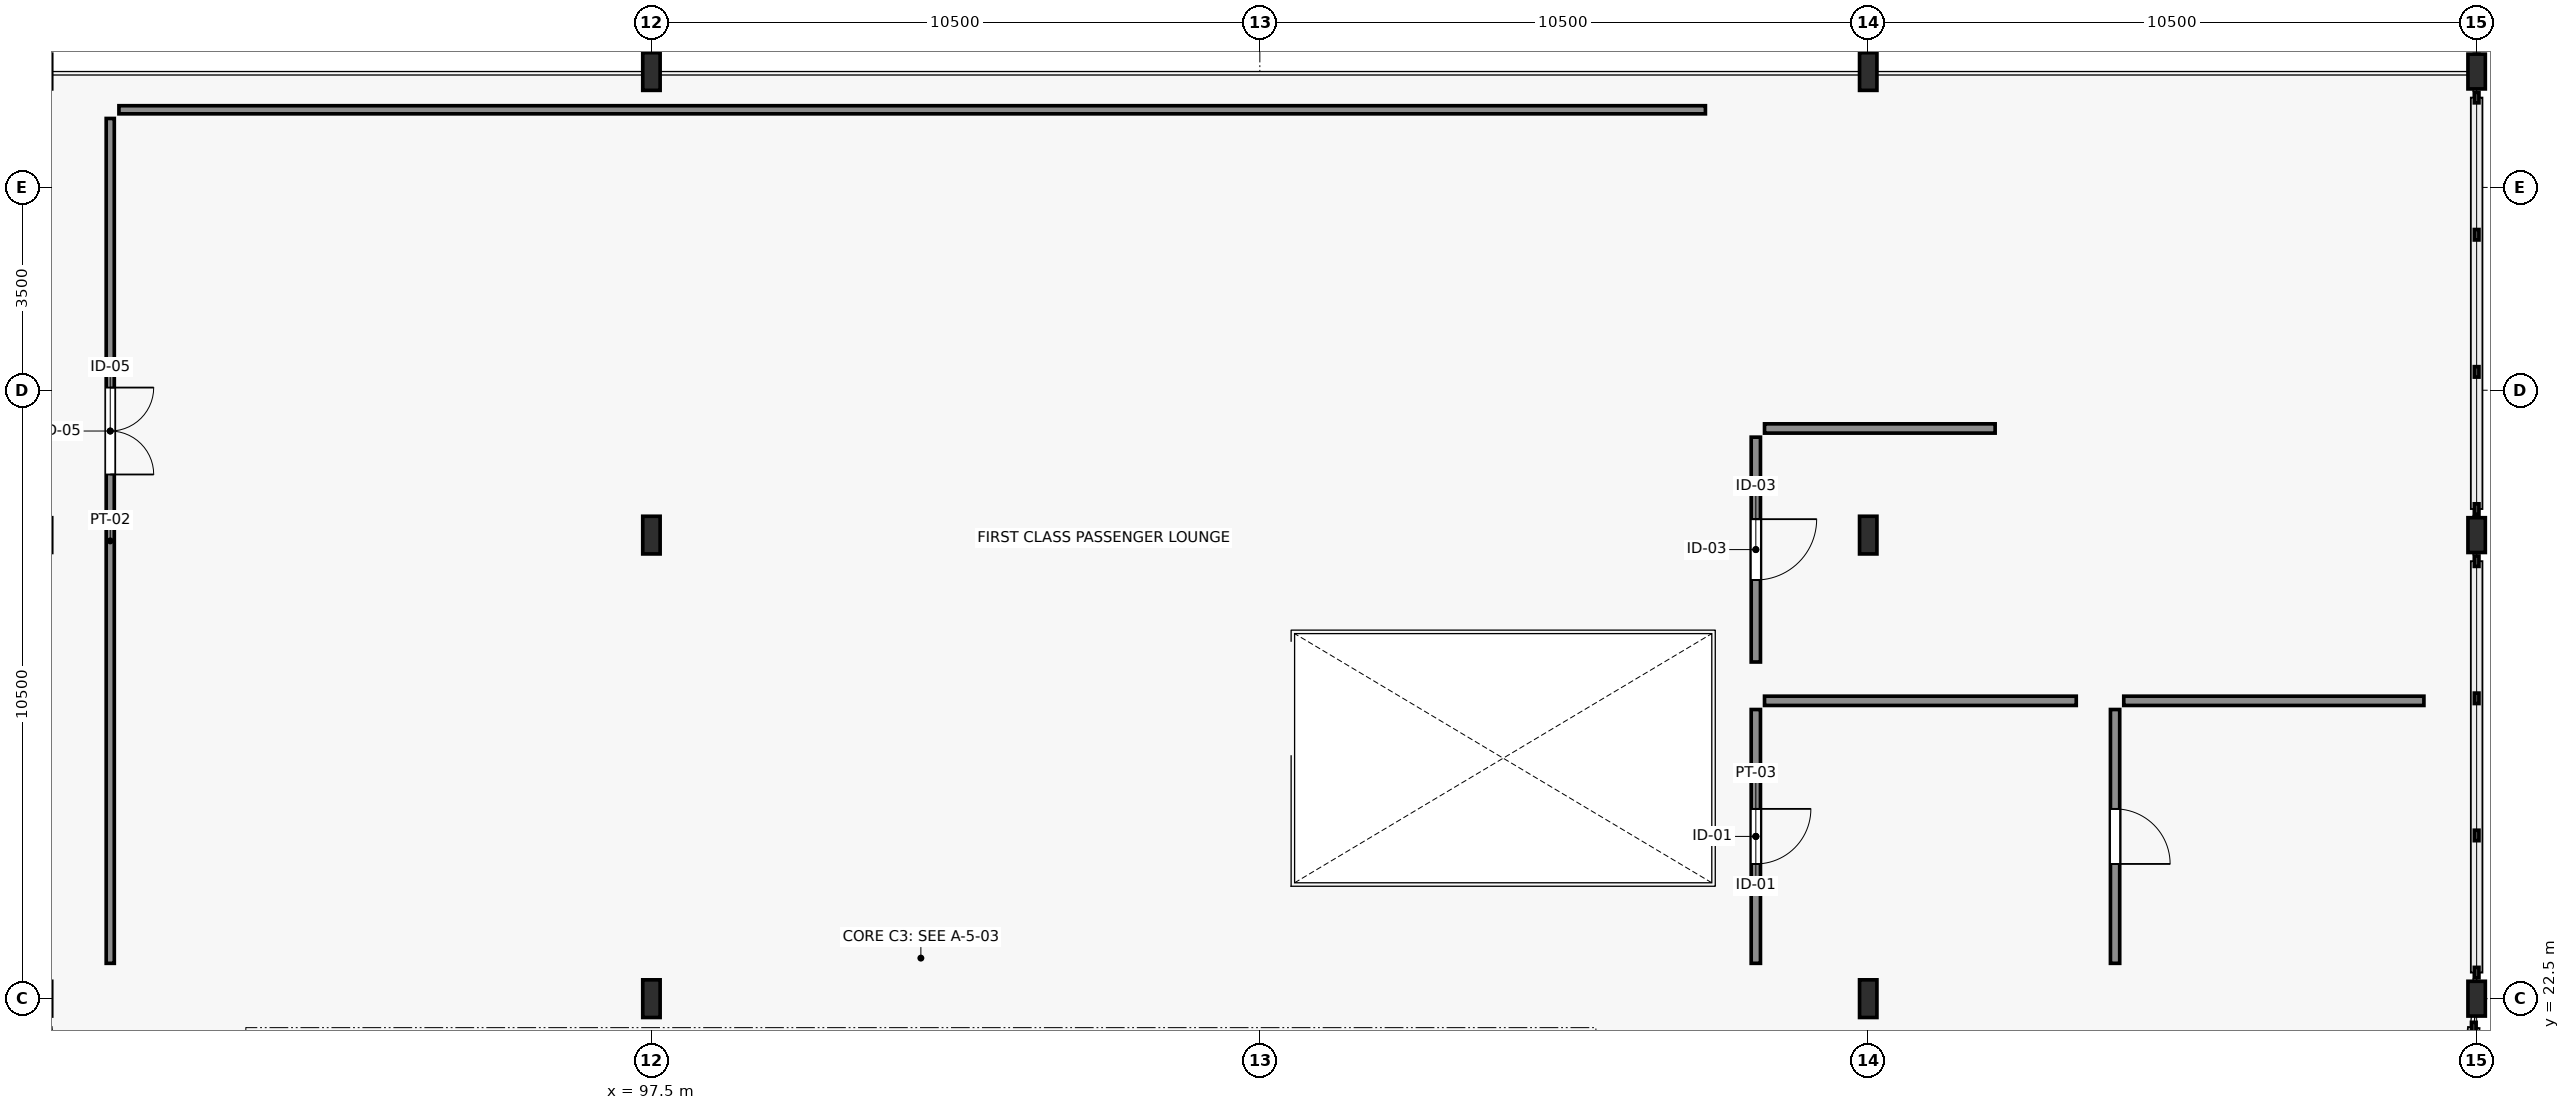
"""IFC4 building model, lengths in metres.
Left out: names, types, materials, properties, quantities, classifications, styles, units other than length and angle.
Written with IfcOpenShell. Run it as: python <this file> out.ifc"""

import sys

from ifc_helpers import new_model, si_unit, direction, frame, frame_2d, origin, origin_2d, place, context, subcontext, project, spatial, rectangle, i_section, extrude, element, fill, save


model = new_model("IFC4")
c1 = context("Model", 3, precision=1e-05, world=origin(), true_north=direction((0.0, 1.0)))
c2 = subcontext(c1, "Body", "Model", "MODEL_VIEW")
j1 = project(units=[si_unit("LENGTHUNIT", "METRE"), si_unit("PLANEANGLEUNIT", "RADIAN")], contexts=[c1])
p1 = place(None, origin())
s1 = spatial("IfcSite", under=j1, at=p1, CompositionType="ELEMENT")
p2 = place(p1, origin())
s2 = spatial("IfcBuilding", under=s1, at=p2, CompositionType="ELEMENT")
p3 = place(p2, frame((0.0, 0.0, 15.0)))
s3 = spatial("IfcBuildingStorey", under=s2, at=p3, CompositionType="ELEMENT", Elevation=15.0)
for number, where, z_axis, x_axis in (
    (1, (97.5, 22.5, 0.0), (0.0, 0.0, 1.0), (1.0, 0.0, 0.0)),
    (2, (118.5, 22.5, 0.0), (0.0, 0.0, 1.0), (1.0, 0.0, 0.0)),
):
    element("IfcColumn", number, at=place(p3, frame(where, z_axis=z_axis, x_axis=x_axis)), inside=s3, PredefinedType="COLUMN", context=c2, shape_type="SweptSolid", body=[
        extrude(i_section(OverallWidth=0.3, OverallDepth=0.65, WebThickness=0.016, FlangeThickness=0.031, FilletRadius=0.027, at=origin_2d()), origin(), (0.0, 0.0, 1.0), 4.5),
    ])
p4 = place(p3, frame((129.0, 22.5, 0.0), z_axis=(0.0, 0.0, 1.0), x_axis=(1.0, 0.0, 0.0)))
e3 = element("IfcColumn", 3, at=p4, inside=s3, PredefinedType="COLUMN", context=c2, shape_type="SweptSolid", body=[
    extrude(i_section(OverallWidth=0.3, OverallDepth=0.6, WebThickness=0.015, FlangeThickness=0.03, FilletRadius=0.027, at=origin_2d()), origin(), (0.0, 0.0, 1.0), 4.5),
])
for number, where, z_axis, x_axis in (
    (4, (97.5, 30.5, 0.0), (0.0, 0.0, 1.0), (1.0, 0.0, 0.0)),
    (5, (118.5, 30.5, 0.0), (0.0, 0.0, 1.0), (1.0, 0.0, 0.0)),
):
    element("IfcColumn", number, at=place(p3, frame(where, z_axis=z_axis, x_axis=x_axis)), inside=s3, PredefinedType="COLUMN", context=c2, shape_type="SweptSolid", body=[
        extrude(i_section(OverallWidth=0.3, OverallDepth=0.65, WebThickness=0.016, FlangeThickness=0.031, FilletRadius=0.027, at=origin_2d()), origin(), (0.0, 0.0, 1.0), 4.5),
    ])
p5 = place(p3, frame((129.0, 30.5, 0.0), z_axis=(0.0, 0.0, 1.0), x_axis=(1.0, 0.0, 0.0)))
e6 = element("IfcColumn", 6, at=p5, inside=s3, PredefinedType="COLUMN", context=c2, shape_type="SweptSolid", body=[
    extrude(i_section(OverallWidth=0.3, OverallDepth=0.6, WebThickness=0.015, FlangeThickness=0.03, FilletRadius=0.027, at=origin_2d()), origin(), (0.0, 0.0, 1.0), 4.5),
])
for number, where, z_axis, x_axis in (
    (7, (97.5, 38.5, 0.0), (0.0, 0.0, 1.0), (1.0, 0.0, 0.0)),
    (8, (118.5, 38.5, 0.0), (0.0, 0.0, 1.0), (1.0, 0.0, 0.0)),
):
    element("IfcColumn", number, at=place(p3, frame(where, z_axis=z_axis, x_axis=x_axis)), inside=s3, PredefinedType="COLUMN", context=c2, shape_type="SweptSolid", body=[
        extrude(i_section(OverallWidth=0.3, OverallDepth=0.65, WebThickness=0.016, FlangeThickness=0.031, FilletRadius=0.027, at=origin_2d()), origin(), (0.0, 0.0, 1.0), 4.5),
    ])
p6 = place(p3, frame((129.0, 38.5, 0.0), z_axis=(0.0, 0.0, 1.0), x_axis=(1.0, 0.0, 0.0)))
e9 = element("IfcColumn", 9, at=p6, inside=s3, PredefinedType="COLUMN", context=c2, shape_type="SweptSolid", body=[
    extrude(i_section(OverallWidth=0.3, OverallDepth=0.6, WebThickness=0.015, FlangeThickness=0.03, FilletRadius=0.027, at=origin_2d()), origin(), (0.0, 0.0, 1.0), 4.5),
])
p7 = place(p3, frame((88.16, 37.69, 0.0), z_axis=(0.0, 0.0, 1.0), x_axis=(0.0, -1.0, 0.0)))
e10 = element("IfcWall", 10, at=p7, inside=s3, PredefinedType="PARTITIONING", context=c2, shape_type="SweptSolid", body=[
    extrude(rectangle(XDim=14.58, YDim=0.14, at=frame_2d((7.29, 0.0))), origin(), (0.0, 0.0, 1.0), 3.8),
])
p8 = place(p7, frame((4.644, 0.0, 0.0)))
e11 = element("IfcOpeningElement", 11, at=p8, cuts=e10, PredefinedType="OPENING", context=c2, shape_type="SweptSolid", body=[
    extrude(rectangle(XDim=1.5, YDim=2.2, at=frame_2d((0.75, 1.1))), frame((0.0, 0.08, 0.0), z_axis=(0.0, -1.0, 0.0), x_axis=(1.0, 0.0, 0.0)), (0.0, 0.0, 1.0), 0.16),
])
p9 = place(p3, frame((88.31, 37.84, 0.0), z_axis=(0.0, 0.0, 1.0), x_axis=(1.0, 0.0, 0.0)))
e12 = element("IfcWall", 12, at=p9, inside=s3, PredefinedType="PARTITIONING", context=c2, shape_type="SweptSolid", body=[
    extrude(rectangle(XDim=27.38, YDim=0.14, at=frame_2d((13.69, 0.0))), origin(), (0.0, 0.0, 1.0), 4.25),
])
p10 = place(p3, frame((116.56, 27.49, 0.0), z_axis=(0.0, 0.0, 1.0), x_axis=(0.0, -1.0, 0.0)))
e13 = element("IfcWall", 13, at=p10, inside=s3, PredefinedType="PARTITIONING", context=c2, shape_type="SweptSolid", body=[
    extrude(rectangle(XDim=4.38, YDim=0.16, at=frame_2d((2.19, 0.0))), origin(), (0.0, 0.0, 1.0), 4.25),
])
p11 = place(p10, frame((1.715, 0.0, 0.0)))
e14 = element("IfcOpeningElement", 14, at=p11, cuts=e13, PredefinedType="OPENING", context=c2, shape_type="SweptSolid", body=[
    extrude(rectangle(XDim=0.95, YDim=2.15, at=frame_2d((0.475, 1.075))), frame((0.0, 0.09, 0.0), z_axis=(0.0, -1.0, 0.0), x_axis=(1.0, 0.0, 0.0)), (0.0, 0.0, 1.0), 0.18),
])
p12 = place(p3, frame((116.71, 27.64, 0.0), z_axis=(0.0, 0.0, 1.0), x_axis=(1.0, 0.0, 0.0)))
e15 = element("IfcWall", 15, at=p12, inside=s3, PredefinedType="PARTITIONING", context=c2, shape_type="SweptSolid", body=[
    extrude(rectangle(XDim=5.38, YDim=0.16, at=frame_2d((2.69, 0.0))), origin(), (0.0, 0.0, 1.0), 4.25),
])
p13 = place(p3, frame((122.76, 27.49, 0.0), z_axis=(0.0, 0.0, 1.0), x_axis=(0.0, -1.0, 0.0)))
e16 = element("IfcWall", 16, at=p13, inside=s3, PredefinedType="PARTITIONING", context=c2, shape_type="SweptSolid", body=[
    extrude(rectangle(XDim=4.38, YDim=0.16, at=frame_2d((2.19, 0.0))), origin(), (0.0, 0.0, 1.0), 4.25),
])
p14 = place(p13, frame((1.715, 0.0, 0.0)))
e17 = element("IfcOpeningElement", 17, at=p14, cuts=e16, PredefinedType="OPENING", context=c2, shape_type="SweptSolid", body=[
    extrude(rectangle(XDim=0.95, YDim=2.15, at=frame_2d((0.475, 1.075))), frame((0.0, 0.09, 0.0), z_axis=(0.0, -1.0, 0.0), x_axis=(1.0, 0.0, 0.0)), (0.0, 0.0, 1.0), 0.18),
])
p15 = place(p3, frame((122.91, 27.64, 0.0), z_axis=(0.0, 0.0, 1.0), x_axis=(1.0, 0.0, 0.0)))
e18 = element("IfcWall", 18, at=p15, inside=s3, PredefinedType="PARTITIONING", context=c2, shape_type="SweptSolid", body=[
    extrude(rectangle(XDim=5.18, YDim=0.16, at=frame_2d((2.59, 0.0))), origin(), (0.0, 0.0, 1.0), 4.25),
])
p16 = place(p3, frame((116.56, 32.19, 0.0), z_axis=(0.0, 0.0, 1.0), x_axis=(0.0, -1.0, 0.0)))
e19 = element("IfcWall", 19, at=p16, inside=s3, PredefinedType="PARTITIONING", context=c2, shape_type="SweptSolid", body=[
    extrude(rectangle(XDim=3.88, YDim=0.16, at=frame_2d((1.94, 0.0))), origin(), (0.0, 0.0, 1.0), 3.74),
])
p17 = place(p16, frame((1.415, 0.0, 0.0)))
e20 = element("IfcOpeningElement", 20, at=p17, cuts=e19, PredefinedType="OPENING", context=c2, shape_type="SweptSolid", body=[
    extrude(rectangle(XDim=1.05, YDim=2.2, at=frame_2d((0.525, 1.1))), frame((0.0, 0.09, 0.0), z_axis=(0.0, -1.0, 0.0), x_axis=(1.0, 0.0, 0.0)), (0.0, 0.0, 1.0), 0.18),
])
p18 = place(p3, frame((116.71, 32.34, 0.0), z_axis=(0.0, 0.0, 1.0), x_axis=(1.0, 0.0, 0.0)))
e21 = element("IfcWall", 21, at=p18, inside=s3, PredefinedType="PARTITIONING", context=c2, shape_type="SweptSolid", body=[
    extrude(rectangle(XDim=3.98, YDim=0.16, at=frame_2d((1.99, 0.0))), origin(), (0.0, 0.0, 1.0), 4.25),
])
p19 = place(p8, origin())
e22 = element("IfcDoor", 22, at=p19, inside=s3, OperationType="DOUBLE_DOOR_SINGLE_SWING", PredefinedType="DOOR", context=c2, shape_type="SweptSolid", body=[
    extrude(rectangle(XDim=1.5, YDim=2.2, at=frame_2d((0.75, 1.1))), frame((0.0, 0.025, 0.0), z_axis=(0.0, -1.0, 0.0), x_axis=(1.0, 0.0, 0.0)), (0.0, 0.0, 1.0), 0.05),
])
fill(e11, e22)
p20 = place(p11, origin())
e23 = element("IfcDoor", 23, at=p20, inside=s3, OperationType="SINGLE_SWING_LEFT", PredefinedType="DOOR", context=c2, shape_type="SweptSolid", body=[
    extrude(rectangle(XDim=0.95, YDim=2.15, at=frame_2d((0.475, 1.075))), frame((0.0, 0.025, 0.0), z_axis=(0.0, -1.0, 0.0), x_axis=(1.0, 0.0, 0.0)), (0.0, 0.0, 1.0), 0.05),
])
fill(e14, e23)
p21 = place(p14, origin())
e24 = element("IfcDoor", 24, at=p21, inside=s3, OperationType="SINGLE_SWING_RIGHT", PredefinedType="DOOR", context=c2, shape_type="SweptSolid", body=[
    extrude(rectangle(XDim=0.95, YDim=2.15, at=frame_2d((0.475, 1.075))), frame((0.0, 0.025, 0.0), z_axis=(0.0, -1.0, 0.0), x_axis=(1.0, 0.0, 0.0)), (0.0, 0.0, 1.0), 0.05),
])
fill(e17, e24)
p22 = place(p17, origin())
e25 = element("IfcDoor", 25, at=p22, inside=s3, OperationType="SINGLE_SWING_LEFT", PredefinedType="DOOR", context=c2, shape_type="SweptSolid", body=[
    extrude(rectangle(XDim=1.05, YDim=2.2, at=frame_2d((0.525, 1.1))), frame((0.0, 0.025, 0.0), z_axis=(0.0, -1.0, 0.0), x_axis=(1.0, 0.0, 0.0)), (0.0, 0.0, 1.0), 0.05),
])
fill(e20, e25)
save(model, sys.argv[1])
